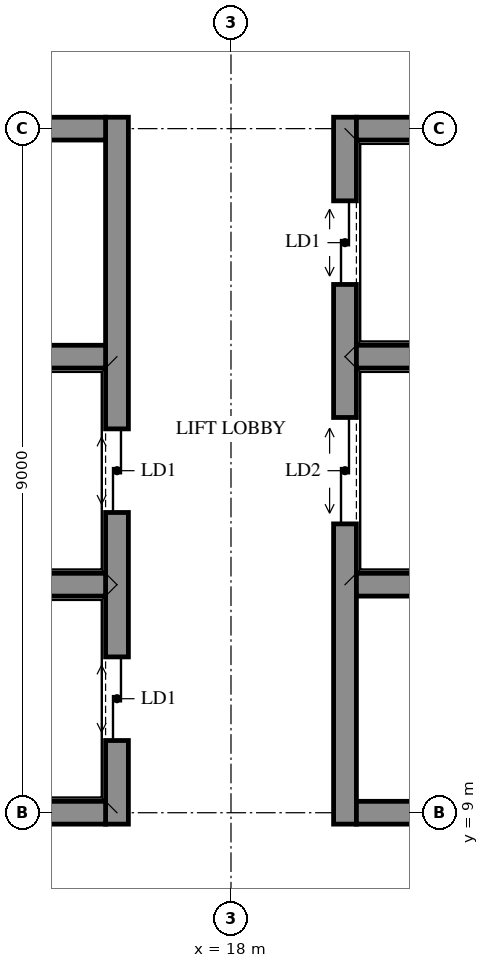
"""IFC4 building model, lengths in metres.
Left out: names, types, materials, properties, quantities, classifications, styles, units other than length and angle.
Written with IfcOpenShell. Run it as: python <this file> out.ifc"""

import sys

from ifc_helpers import new_model, si_unit, direction, frame, frame_2d, origin, place, context, subcontext, project, spatial, rectangle, extrude, element, fill, save


model = new_model("IFC4")
c1 = context("Model", 3, precision=1e-05, world=origin(), true_north=direction((0.0, 1.0)))
c2 = subcontext(c1, "Body", "Model", "MODEL_VIEW")
j1 = project(units=[si_unit("LENGTHUNIT", "METRE"), si_unit("PLANEANGLEUNIT", "RADIAN")], contexts=[c1])
p1 = place(None, origin())
s1 = spatial("IfcSite", under=j1, at=p1, CompositionType="ELEMENT")
p2 = place(p1, origin())
s2 = spatial("IfcBuilding", under=s1, at=p2, CompositionType="ELEMENT")
p3 = place(p2, frame((0.0, 0.0, 52.8)))
s3 = spatial("IfcBuildingStorey", under=s2, at=p3, CompositionType="ELEMENT", Elevation=52.8)
p4 = place(p3, frame((16.5, 8.85, 0.0), z_axis=(0.0, 0.0, 1.0), x_axis=(0.0, 1.0, 0.0)))
e1 = element("IfcWall", 1, at=p4, inside=s3, PredefinedType="SHEAR", context=c2, shape_type="SweptSolid", body=[
    extrude(rectangle(XDim=9.3, YDim=0.3, at=frame_2d((4.65, 0.0))), origin(), (0.0, 0.0, 1.0), 4.2),
])
p5 = place(p4, frame((1.1, 0.0, 0.0)))
e2 = element("IfcOpeningElement", 2, at=p5, cuts=e1, PredefinedType="OPENING", context=c2, shape_type="SweptSolid", body=[
    extrude(rectangle(XDim=1.1, YDim=2.1, at=frame_2d((0.55, 1.05))), frame((0.0, 0.16, 0.0), z_axis=(0.0, -1.0, 0.0), x_axis=(1.0, 0.0, 0.0)), (0.0, 0.0, 1.0), 0.32),
])
p6 = place(p4, frame((4.1, 0.0, 0.0)))
e3 = element("IfcOpeningElement", 3, at=p6, cuts=e1, PredefinedType="OPENING", context=c2, shape_type="SweptSolid", body=[
    extrude(rectangle(XDim=1.1, YDim=2.1, at=frame_2d((0.55, 1.05))), frame((0.0, 0.16, 0.0), z_axis=(0.0, -1.0, 0.0), x_axis=(1.0, 0.0, 0.0)), (0.0, 0.0, 1.0), 0.32),
])
p7 = place(p3, frame((19.5, 8.85, 0.0), z_axis=(0.0, 0.0, 1.0), x_axis=(0.0, 1.0, 0.0)))
e4 = element("IfcWall", 4, at=p7, inside=s3, PredefinedType="SHEAR", context=c2, shape_type="SweptSolid", body=[
    extrude(rectangle(XDim=9.3, YDim=0.3, at=frame_2d((4.65, 0.0))), origin(), (0.0, 0.0, 1.0), 4.2),
])
p8 = place(p7, frame((3.95, 0.0, 0.0)))
e5 = element("IfcOpeningElement", 5, at=p8, cuts=e4, PredefinedType="OPENING", context=c2, shape_type="SweptSolid", body=[
    extrude(rectangle(XDim=1.4, YDim=2.1, at=frame_2d((0.7, 1.05))), frame((0.0, 0.16, 0.0), z_axis=(0.0, -1.0, 0.0), x_axis=(1.0, 0.0, 0.0)), (0.0, 0.0, 1.0), 0.32),
])
p9 = place(p7, frame((7.1, 0.0, 0.0)))
e6 = element("IfcOpeningElement", 6, at=p9, cuts=e4, PredefinedType="OPENING", context=c2, shape_type="SweptSolid", body=[
    extrude(rectangle(XDim=1.1, YDim=2.1, at=frame_2d((0.55, 1.05))), frame((0.0, 0.16, 0.0), z_axis=(0.0, -1.0, 0.0), x_axis=(1.0, 0.0, 0.0)), (0.0, 0.0, 1.0), 0.32),
])
for number, where, z_axis, x_axis in (
    (7, (13.65, 9.0, 0.0), (0.0, 0.0, 1.0), (1.0, 0.0, 0.0)),
    (8, (19.65, 9.0, 0.0), (0.0, 0.0, 1.0), (1.0, 0.0, 0.0)),
    (9, (13.65, 12.0, 0.0), (0.0, 0.0, 1.0), (1.0, 0.0, 0.0)),
    (10, (19.65, 12.0, 0.0), (0.0, 0.0, 1.0), (1.0, 0.0, 0.0)),
    (11, (13.65, 15.0, 0.0), (0.0, 0.0, 1.0), (1.0, 0.0, 0.0)),
    (12, (19.65, 15.0, 0.0), (0.0, 0.0, 1.0), (1.0, 0.0, 0.0)),
    (13, (13.65, 18.0, 0.0), (0.0, 0.0, 1.0), (1.0, 0.0, 0.0)),
    (14, (19.65, 18.0, 0.0), (0.0, 0.0, 1.0), (1.0, 0.0, 0.0)),
):
    element("IfcWall", number, at=place(p3, frame(where, z_axis=z_axis, x_axis=x_axis)), inside=s3, PredefinedType="SHEAR", context=c2, shape_type="SweptSolid", body=[
        extrude(rectangle(XDim=2.7, YDim=0.3, at=frame_2d((1.35, 0.0))), origin(), (0.0, 0.0, 1.0), 4.2),
    ])
p10 = place(p5, origin())
e15 = element("IfcDoor", 15, at=p10, inside=s3, OperationType="DOUBLE_DOOR_SLIDING", PredefinedType="DOOR", context=c2, shape_type="SweptSolid", body=[
    extrude(rectangle(XDim=1.1, YDim=2.1, at=frame_2d((0.55, 1.05))), frame((0.0, 0.025, 0.0), z_axis=(0.0, -1.0, 0.0), x_axis=(1.0, 0.0, 0.0)), (0.0, 0.0, 1.0), 0.05),
])
fill(e2, e15)
p11 = place(p6, origin())
e16 = element("IfcDoor", 16, at=p11, inside=s3, OperationType="DOUBLE_DOOR_SLIDING", PredefinedType="DOOR", context=c2, shape_type="SweptSolid", body=[
    extrude(rectangle(XDim=1.1, YDim=2.1, at=frame_2d((0.55, 1.05))), frame((0.0, 0.025, 0.0), z_axis=(0.0, -1.0, 0.0), x_axis=(1.0, 0.0, 0.0)), (0.0, 0.0, 1.0), 0.05),
])
fill(e3, e16)
p12 = place(p8, origin())
e17 = element("IfcDoor", 17, at=p12, inside=s3, OperationType="DOUBLE_DOOR_SLIDING", PredefinedType="DOOR", context=c2, shape_type="SweptSolid", body=[
    extrude(rectangle(XDim=1.4, YDim=2.1, at=frame_2d((0.7, 1.05))), frame((0.0, 0.025, 0.0), z_axis=(0.0, -1.0, 0.0), x_axis=(1.0, 0.0, 0.0)), (0.0, 0.0, 1.0), 0.05),
])
fill(e5, e17)
p13 = place(p9, origin())
e18 = element("IfcDoor", 18, at=p13, inside=s3, OperationType="DOUBLE_DOOR_SLIDING", PredefinedType="DOOR", context=c2, shape_type="SweptSolid", body=[
    extrude(rectangle(XDim=1.1, YDim=2.1, at=frame_2d((0.55, 1.05))), frame((0.0, 0.025, 0.0), z_axis=(0.0, -1.0, 0.0), x_axis=(1.0, 0.0, 0.0)), (0.0, 0.0, 1.0), 0.05),
])
fill(e6, e18)
save(model, sys.argv[1])
